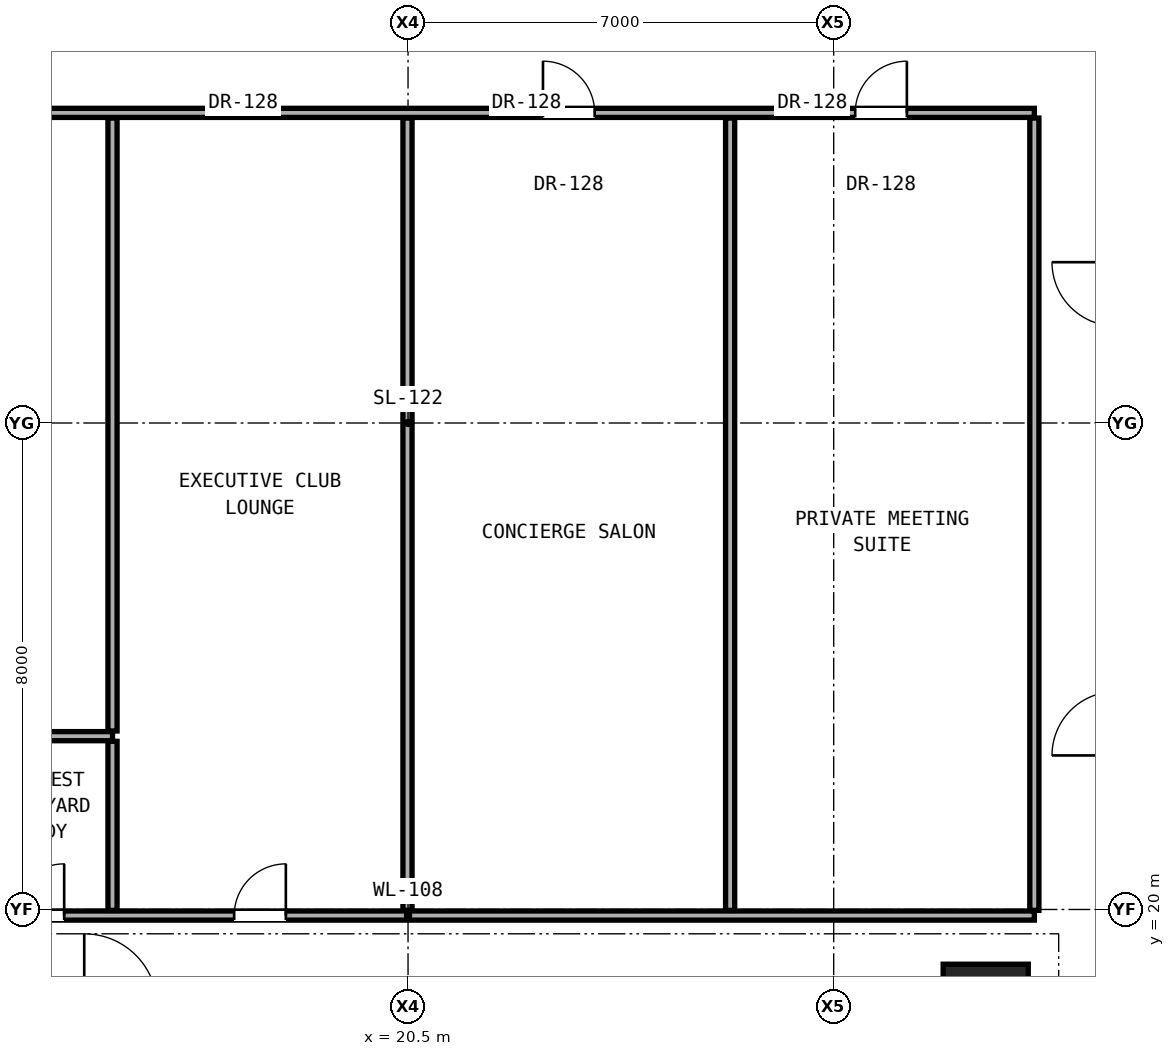
"""IFC4 building model, lengths in metres.
Left out: names, types, materials, properties, quantities, classifications, styles, units other than length and angle.
Written with IfcOpenShell. Run it as: python <this file> out.ifc"""

import sys

from ifc_helpers import new_model, si_unit, direction, frame, frame_2d, origin, origin_2d, place, context, subcontext, project, spatial, rectangle, extrude, element, fill, save


model = new_model("IFC4")
c1 = context("Model", 3, precision=1e-05, world=origin(), true_north=direction((0.0, 1.0)))
c2 = subcontext(c1, "Body", "Model", "MODEL_VIEW")
j1 = project(units=[si_unit("LENGTHUNIT", "METRE"), si_unit("PLANEANGLEUNIT", "RADIAN")], contexts=[c1])
p1 = place(None, origin())
s1 = spatial("IfcSite", under=j1, at=p1, CompositionType="ELEMENT")
p2 = place(p1, origin())
s2 = spatial("IfcBuilding", under=s1, at=p2, CompositionType="ELEMENT")
p3 = place(p2, frame((0.0, 0.0, 48.8)))
s3 = spatial("IfcBuildingStorey", under=s2, at=p3, CompositionType="ELEMENT", Elevation=48.8)
p4 = place(p3, frame((30.0, 18.4, 0.0), z_axis=(0.0, 0.0, 1.0), x_axis=(1.0, 0.0, 0.0)))
e1 = element("IfcColumn", 1, at=p4, inside=s3, PredefinedType="COLUMN", context=c2, shape_type="SweptSolid", body=[
    extrude(rectangle(XDim=1.4, YDim=1.4, at=origin_2d()), origin(), (0.0, 0.0, 1.0), 3.3),
])
p5 = place(p3, frame((10.2, 19.9, 0.0), z_axis=(0.0, 0.0, 1.0), x_axis=(1.0, 0.0, 0.0)))
e2 = element("IfcWall", 2, at=p5, inside=s3, PredefinedType="PARTITIONING", context=c2, shape_type="SweptSolid", body=[
    extrude(rectangle(XDim=20.6, YDim=0.15, at=frame_2d((10.3, 0.0))), origin(), (0.0, 0.0, 1.0), 2.104),
])
p6 = place(p5, frame((1.695, 0.0, 0.0)))
e3 = element("IfcOpeningElement", 3, at=p6, cuts=e2, PredefinedType="OPENING", context=c2, shape_type="SweptSolid", body=[
    extrude(rectangle(XDim=0.85, YDim=2.01, at=frame_2d((0.425, 1.005))), frame((0.0, 0.085, 0.0), z_axis=(0.0, -1.0, 0.0), x_axis=(1.0, 0.0, 0.0)), (0.0, 0.0, 1.0), 0.17),
])
p7 = place(p5, frame((3.795, 0.0, 0.0)))
e4 = element("IfcOpeningElement", 4, at=p7, cuts=e2, PredefinedType="OPENING", context=c2, shape_type="SweptSolid", body=[
    extrude(rectangle(XDim=0.85, YDim=2.01, at=frame_2d((0.425, 1.005))), frame((0.0, 0.085, 0.0), z_axis=(0.0, -1.0, 0.0), x_axis=(1.0, 0.0, 0.0)), (0.0, 0.0, 1.0), 0.17),
])
p8 = place(p5, frame((7.44, 0.0, 0.0)))
e5 = element("IfcOpeningElement", 5, at=p8, cuts=e2, PredefinedType="OPENING", context=c2, shape_type="SweptSolid", body=[
    extrude(rectangle(XDim=0.85, YDim=2.01, at=frame_2d((0.425, 1.005))), frame((0.0, 0.085, 0.0), z_axis=(0.0, -1.0, 0.0), x_axis=(1.0, 0.0, 0.0)), (0.0, 0.0, 1.0), 0.17),
])
p9 = place(p3, frame((10.2, 22.85, 0.0), z_axis=(0.0, 0.0, 1.0), x_axis=(1.0, 0.0, 0.0)))
e6 = element("IfcWall", 6, at=p9, inside=s3, PredefinedType="PARTITIONING", context=c2, shape_type="SweptSolid", body=[
    extrude(rectangle(XDim=5.44, YDim=0.15, at=frame_2d((2.72, 0.0))), origin(), (0.0, 0.0, 1.0), 2.104),
])
p10 = place(p3, frame((10.2, 33.1, 0.0), z_axis=(0.0, 0.0, 1.0), x_axis=(1.0, 0.0, 0.0)))
e7 = element("IfcWall", 7, at=p10, inside=s3, PredefinedType="PARTITIONING", context=c2, shape_type="SweptSolid", body=[
    extrude(rectangle(XDim=20.6, YDim=0.15, at=frame_2d((10.3, 0.0))), origin(), (0.0, 0.0, 1.0), 2.104),
])
p11 = place(p10, frame((12.519, 0.0, 0.0)))
e8 = element("IfcOpeningElement", 8, at=p11, cuts=e7, PredefinedType="OPENING", context=c2, shape_type="SweptSolid", body=[
    extrude(rectangle(XDim=0.85, YDim=2.01, at=frame_2d((0.425, 1.005))), frame((0.0, 0.085, 0.0), z_axis=(0.0, -1.0, 0.0), x_axis=(1.0, 0.0, 0.0)), (0.0, 0.0, 1.0), 0.17),
])
p12 = place(p10, frame((17.654, 0.0, 0.0)))
e9 = element("IfcOpeningElement", 9, at=p12, cuts=e7, PredefinedType="OPENING", context=c2, shape_type="SweptSolid", body=[
    extrude(rectangle(XDim=0.85, YDim=2.01, at=frame_2d((0.425, 1.005))), frame((0.0, 0.085, 0.0), z_axis=(0.0, -1.0, 0.0), x_axis=(1.0, 0.0, 0.0)), (0.0, 0.0, 1.0), 0.17),
])
p13 = place(p3, frame((15.64, 19.985, 0.0), z_axis=(0.0, 0.0, 1.0), x_axis=(0.0, 1.0, 0.0)))
e10 = element("IfcWall", 10, at=p13, inside=s3, PredefinedType="PARTITIONING", context=c2, shape_type="SweptSolid", body=[
    extrude(rectangle(XDim=2.78, YDim=0.15, at=frame_2d((1.39, 0.0))), origin(), (0.0, 0.0, 1.0), 2.589),
])
p14 = place(p3, frame((15.64, 22.935, 0.0), z_axis=(0.0, 0.0, 1.0), x_axis=(0.0, 1.0, 0.0)))
e11 = element("IfcWall", 11, at=p14, inside=s3, PredefinedType="PARTITIONING", context=c2, shape_type="SweptSolid", body=[
    extrude(rectangle(XDim=10.08, YDim=0.15, at=frame_2d((5.04, 0.0))), origin(), (0.0, 0.0, 1.0), 2.104),
])
for number, where, z_axis, x_axis in (
    (12, (20.491, 19.985, 0.0), (0.0, 0.0, 1.0), (0.0, 1.0, 0.0)),
    (13, (25.797, 19.985, 0.0), (0.0, 0.0, 1.0), (0.0, 1.0, 0.0)),
):
    element("IfcWall", number, at=place(p3, frame(where, z_axis=z_axis, x_axis=x_axis)), inside=s3, PredefinedType="PARTITIONING", context=c2, shape_type="SweptSolid", body=[
        extrude(rectangle(XDim=13.03, YDim=0.15, at=frame_2d((6.515, 0.0))), origin(), (0.0, 0.0, 1.0), 2.104),
    ])
p15 = place(p3, frame((30.8, 19.985, 0.0), z_axis=(0.0, 0.0, 1.0), x_axis=(0.0, 1.0, 0.0)))
e14 = element("IfcWall", 14, at=p15, inside=s3, PredefinedType="PARTITIONING", context=c2, shape_type="SweptSolid", body=[
    extrude(rectangle(XDim=13.03, YDim=0.15, at=frame_2d((6.515, 0.0))), origin(), (0.0, 0.0, 1.0), 2.279),
])
p16 = place(p7, origin())
e15 = element("IfcDoor", 15, at=p16, inside=s3, OperationType="SINGLE_SWING_RIGHT", PredefinedType="DOOR", context=c2, shape_type="SweptSolid", body=[
    extrude(rectangle(XDim=0.85, YDim=2.01, at=frame_2d((0.425, 1.005))), frame((0.0, 0.025, 0.0), z_axis=(0.0, -1.0, 0.0), x_axis=(1.0, 0.0, 0.0)), (0.0, 0.0, 1.0), 0.05),
])
fill(e4, e15)
p17 = place(p8, origin())
e16 = element("IfcDoor", 16, at=p17, inside=s3, OperationType="SINGLE_SWING_RIGHT", PredefinedType="DOOR", context=c2, shape_type="SweptSolid", body=[
    extrude(rectangle(XDim=0.85, YDim=2.01, at=frame_2d((0.425, 1.005))), frame((0.0, 0.025, 0.0), z_axis=(0.0, -1.0, 0.0), x_axis=(1.0, 0.0, 0.0)), (0.0, 0.0, 1.0), 0.05),
])
fill(e5, e16)
p18 = place(p11, origin())
e17 = element("IfcDoor", 17, at=p18, inside=s3, OperationType="SINGLE_SWING_LEFT", PredefinedType="DOOR", context=c2, shape_type="SweptSolid", body=[
    extrude(rectangle(XDim=0.85, YDim=2.01, at=frame_2d((0.425, 1.005))), frame((0.0, 0.025, 0.0), z_axis=(0.0, -1.0, 0.0), x_axis=(1.0, 0.0, 0.0)), (0.0, 0.0, 1.0), 0.05),
])
fill(e8, e17)
p19 = place(p12, origin())
e18 = element("IfcDoor", 18, at=p19, inside=s3, OperationType="SINGLE_SWING_RIGHT", PredefinedType="DOOR", context=c2, shape_type="SweptSolid", body=[
    extrude(rectangle(XDim=0.85, YDim=2.01, at=frame_2d((0.425, 1.005))), frame((0.0, 0.025, 0.0), z_axis=(0.0, -1.0, 0.0), x_axis=(1.0, 0.0, 0.0)), (0.0, 0.0, 1.0), 0.05),
])
fill(e9, e18)
save(model, sys.argv[1])
